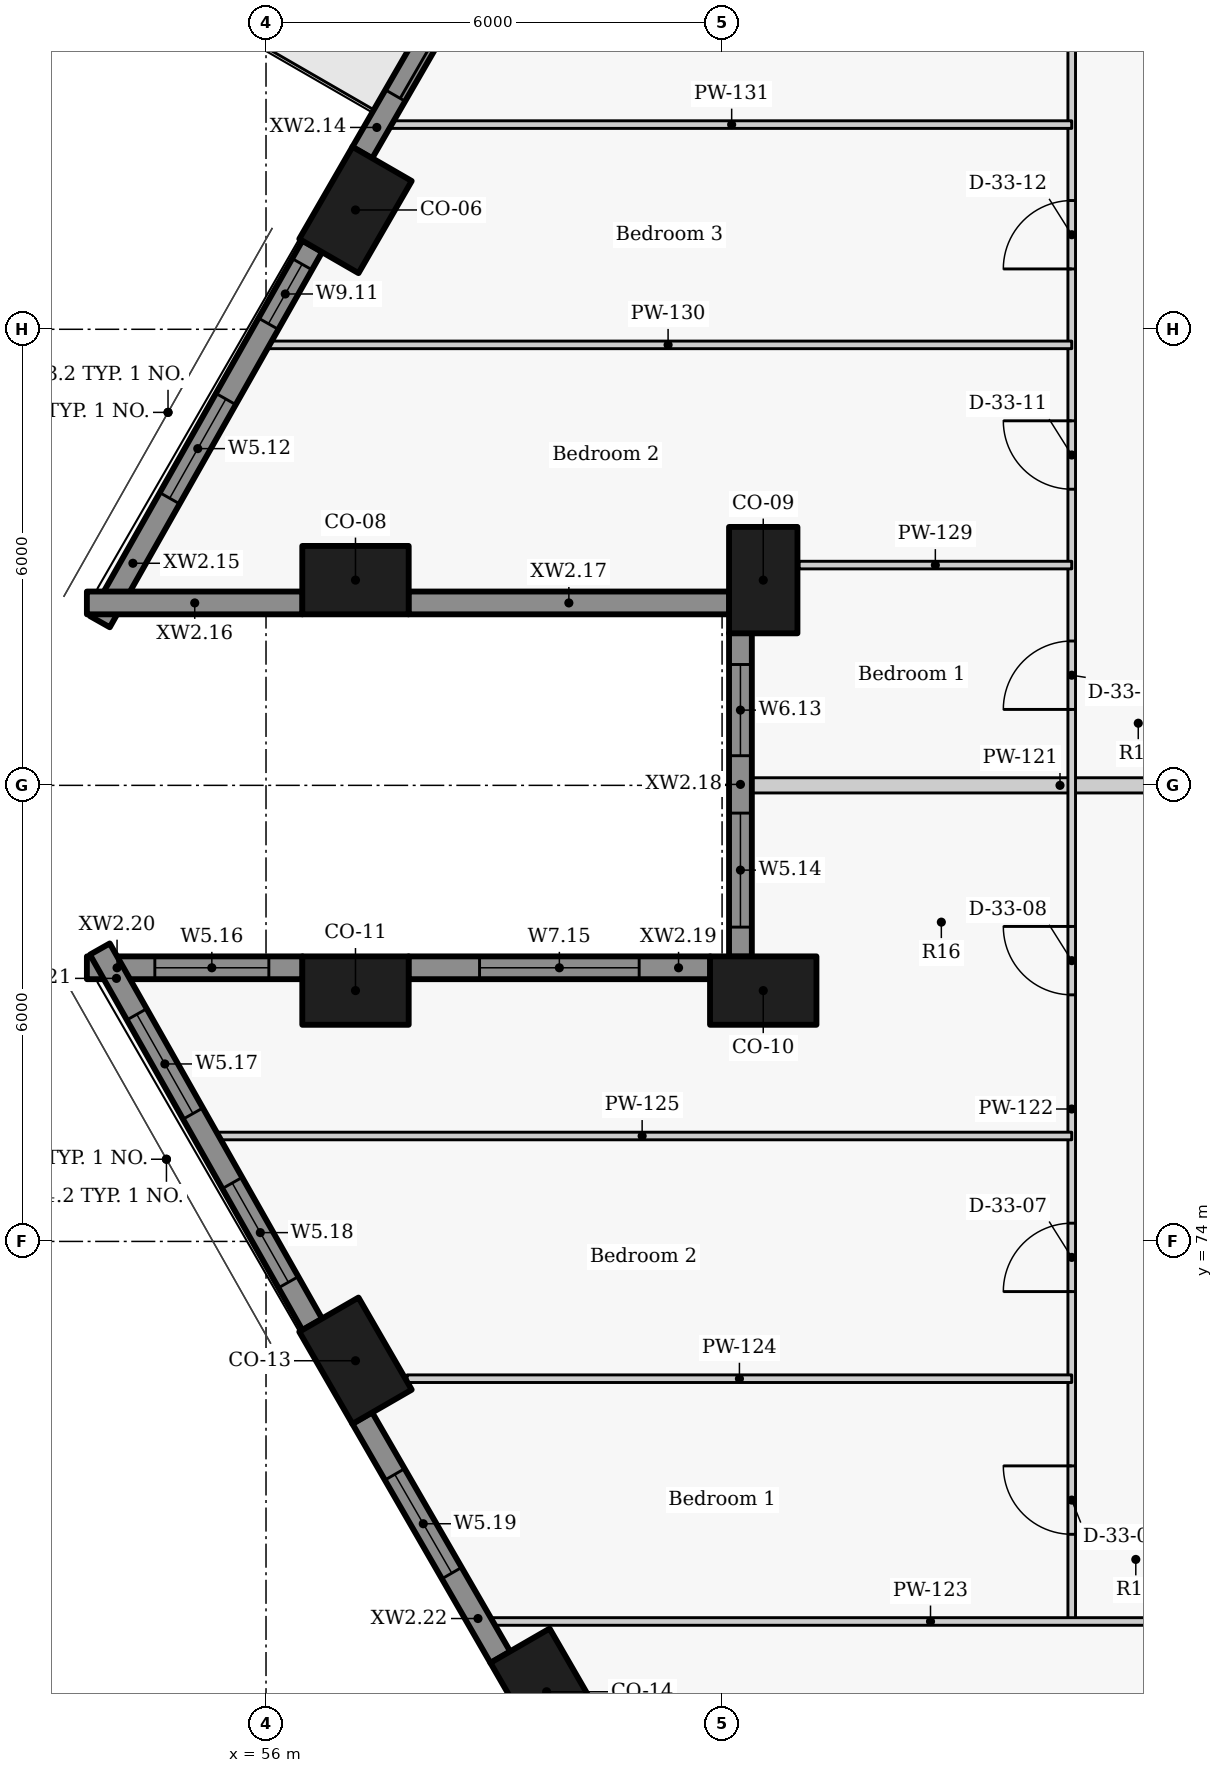
"""IFC4 building model, lengths in metres.
Left out: names, types, materials, properties, quantities, classifications, styles, units other than length and angle.
Written with IfcOpenShell. Run it as: python <this file> out.ifc"""

import sys

from ifc_helpers import new_model, si_unit, direction, frame, frame_2d, origin, origin_2d, place, context, subcontext, project, spatial, rectangle, extrude, element, fill, save


model = new_model("IFC4")
c1 = context("Model", 3, precision=1e-05, world=origin(), true_north=direction((0.0, 1.0)))
c2 = subcontext(c1, "Body", "Model", "MODEL_VIEW")
j1 = project(units=[si_unit("LENGTHUNIT", "METRE"), si_unit("PLANEANGLEUNIT", "RADIAN")], contexts=[c1])
p1 = place(None, origin())
s1 = spatial("IfcSite", under=j1, at=p1, CompositionType="ELEMENT")
p2 = place(p1, origin())
s2 = spatial("IfcBuilding", under=s1, at=p2, CompositionType="ELEMENT")
p3 = place(p2, frame((0.0, 0.0, 107.4)))
s3 = spatial("IfcBuildingStorey", under=s2, at=p3, CompositionType="ELEMENT", Elevation=107.4)
for number, where, z_axis, x_axis in (
    (1, (57.177, 87.57, 0.0), (0.0, 0.0, 1.0), (-0.5, -0.866, 0.0)),
    (2, (57.177, 82.7, 0.0), (0.0, 0.0, 1.0), (1.0, 0.0, 0.0)),
    (3, (62.542, 82.7, 0.0), (0.0, 0.0, 1.0), (0.0, -1.0, 0.0)),
    (4, (62.542, 77.3, 0.0), (0.0, 0.0, 1.0), (-1.0, 0.0, 0.0)),
    (5, (57.177, 77.3, 0.0), (0.0, 0.0, 1.0), (-1.0, 0.0, 0.0)),
    (6, (57.177, 72.43, 0.0), (0.0, 0.0, 1.0), (0.5, -0.866, 0.0)),
    (7, (59.692, 68.075, 0.0), (0.0, 0.0, 1.0), (0.5, -0.866, 0.0)),
):
    element("IfcColumn", number, at=place(p3, frame(where, z_axis=z_axis, x_axis=x_axis)), inside=s3, PredefinedType="COLUMN", context=c2, shape_type="SweptSolid", body=[
        extrude(rectangle(XDim=1.4, YDim=0.9, at=origin_2d()), origin(), (0.0, 0.0, 1.0), 3.3),
    ])
p4 = place(p3, frame((59.084, 91.472, 0.0), z_axis=(0.0, 0.0, 1.0), x_axis=(-0.500009139881, -0.866020126807, 0.0)))
e8 = element("IfcWall", 8, at=p4, inside=s3, PredefinedType="SOLIDWALL", context=c2, shape_type="SweptSolid", body=[
    extrude(rectangle(XDim=3.637, YDim=0.3, at=frame_2d((1.818, 0.0))), origin(), (0.0, 0.0, 1.0), 2.425),
])
p5 = place(p4, frame((0.368, 0.0, 0.0)))
e9 = element("IfcOpeningElement", 9, at=p5, cuts=e8, PredefinedType="OPENING", context=c2, shape_type="SweptSolid", body=[
    extrude(rectangle(XDim=2.4, YDim=2.0, at=frame_2d((1.2, 1.0))), frame((0.0, 0.16, 0.0), z_axis=(0.0, -1.0, 0.0), x_axis=(1.0, 0.0, 0.0)), (0.0, 0.0, 1.0), 0.32),
])
p6 = place(p3, frame((56.609, 87.094, 0.0), z_axis=(0.0, 0.0, 1.0), x_axis=(-0.492456858874, -0.870336855561, 0.0)))
e10 = element("IfcWall", 10, at=p6, inside=s3, PredefinedType="SOLIDWALL", context=c2, shape_type="SweptSolid", body=[
    extrude(rectangle(XDim=5.677, YDim=0.3, at=frame_2d((2.838, 0.0))), origin(), (0.0, 0.0, 1.0), 2.425),
])
p7 = place(p6, frame((0.273, 0.0, 0.9)))
e11 = element("IfcOpeningElement", 11, at=p7, cuts=e10, PredefinedType="OPENING", context=c2, shape_type="SweptSolid", body=[
    extrude(rectangle(XDim=0.9, YDim=1.1, at=frame_2d((0.45, 0.55))), frame((0.0, 0.16, 0.0), z_axis=(0.0, -1.0, 0.0), x_axis=(1.0, 0.0, 0.0)), (0.0, 0.0, 1.0), 0.32),
])
p8 = place(p6, frame((2.311, 0.0, 0.9)))
e12 = element("IfcOpeningElement", 12, at=p8, cuts=e10, PredefinedType="OPENING", context=c2, shape_type="SweptSolid", body=[
    extrude(rectangle(XDim=1.5, YDim=1.1, at=frame_2d((0.75, 0.55))), frame((0.0, 0.16, 0.0), z_axis=(0.0, -1.0, 0.0), x_axis=(1.0, 0.0, 0.0)), (0.0, 0.0, 1.0), 0.32),
])
p9 = place(p3, frame((53.643, 82.4, 0.0), z_axis=(0.0, 0.0, 1.0), x_axis=(1.0, 0.0, 0.0)))
e13 = element("IfcWall", 13, at=p9, inside=s3, PredefinedType="SOLIDWALL", context=c2, shape_type="SweptSolid", body=[
    extrude(rectangle(XDim=2.838, YDim=0.3, at=frame_2d((1.419, 0.0))), origin(), (0.0, 0.0, 1.0), 2.425),
])
p10 = place(p3, frame((57.873, 82.4, 0.0), z_axis=(0.0, 0.0, 1.0), x_axis=(1.0, 0.0, 0.0)))
e14 = element("IfcWall", 14, at=p10, inside=s3, PredefinedType="SOLIDWALL", context=c2, shape_type="SweptSolid", body=[
    extrude(rectangle(XDim=4.223, YDim=0.3, at=frame_2d((2.111, 0.0))), origin(), (0.0, 0.0, 1.0), 2.425),
])
p11 = place(p3, frame((62.242, 82.004, 0.0), z_axis=(0.0, 0.0, 1.0), x_axis=(0.0, -1.0, 0.0)))
e15 = element("IfcWall", 15, at=p11, inside=s3, PredefinedType="SOLIDWALL", context=c2, shape_type="SweptSolid", body=[
    extrude(rectangle(XDim=4.258, YDim=0.3, at=frame_2d((2.129, 0.0))), origin(), (0.0, 0.0, 1.0), 2.425),
])
p12 = place(p11, frame((0.414, 0.0, 0.9)))
e16 = element("IfcOpeningElement", 16, at=p12, cuts=e15, PredefinedType="OPENING", context=c2, shape_type="SweptSolid", body=[
    extrude(rectangle(XDim=1.2, YDim=1.1, at=frame_2d((0.6, 0.55))), frame((0.0, 0.16, 0.0), z_axis=(0.0, -1.0, 0.0), x_axis=(1.0, 0.0, 0.0)), (0.0, 0.0, 1.0), 0.32),
])
p13 = place(p11, frame((2.369, 0.0, 0.9)))
e17 = element("IfcOpeningElement", 17, at=p13, cuts=e15, PredefinedType="OPENING", context=c2, shape_type="SweptSolid", body=[
    extrude(rectangle(XDim=1.5, YDim=1.1, at=frame_2d((0.75, 0.55))), frame((0.0, 0.16, 0.0), z_axis=(0.0, -1.0, 0.0), x_axis=(1.0, 0.0, 0.0)), (0.0, 0.0, 1.0), 0.32),
])
p14 = place(p3, frame((61.846, 77.6, 0.0), z_axis=(0.0, 0.0, 1.0), x_axis=(-1.0, 0.0, 0.0)))
e18 = element("IfcWall", 18, at=p14, inside=s3, PredefinedType="SOLIDWALL", context=c2, shape_type="SweptSolid", body=[
    extrude(rectangle(XDim=3.973, YDim=0.3, at=frame_2d((1.986, 0.0))), origin(), (0.0, 0.0, 1.0), 2.425),
])
p15 = place(p14, frame((0.936, 0.0, 0.9)))
e19 = element("IfcOpeningElement", 19, at=p15, cuts=e18, PredefinedType="OPENING", context=c2, shape_type="SweptSolid", body=[
    extrude(rectangle(XDim=2.1, YDim=1.1, at=frame_2d((1.05, 0.55))), frame((0.0, 0.16, 0.0), z_axis=(0.0, -1.0, 0.0), x_axis=(1.0, 0.0, 0.0)), (0.0, 0.0, 1.0), 0.32),
])
p16 = place(p3, frame((56.481, 77.6, 0.0), z_axis=(0.0, 0.0, 1.0), x_axis=(-1.0, 0.0, 0.0)))
e20 = element("IfcWall", 20, at=p16, inside=s3, PredefinedType="SOLIDWALL", context=c2, shape_type="SweptSolid", body=[
    extrude(rectangle(XDim=2.838, YDim=0.3, at=frame_2d((1.419, 0.0))), origin(), (0.0, 0.0, 1.0), 2.425),
])
p17 = place(p16, frame((0.444, 0.0, 0.9)))
e21 = element("IfcOpeningElement", 21, at=p17, cuts=e20, PredefinedType="OPENING", context=c2, shape_type="SweptSolid", body=[
    extrude(rectangle(XDim=1.5, YDim=1.1, at=frame_2d((0.75, 0.55))), frame((0.0, 0.16, 0.0), z_axis=(0.0, -1.0, 0.0), x_axis=(1.0, 0.0, 0.0)), (0.0, 0.0, 1.0), 0.32),
])
p18 = place(p3, frame((53.814, 77.847, 0.0), z_axis=(0.0, 0.0, 1.0), x_axis=(0.492456858874, -0.870336855561, 0.0)))
e22 = element("IfcWall", 22, at=p18, inside=s3, PredefinedType="SOLIDWALL", context=c2, shape_type="SweptSolid", body=[
    extrude(rectangle(XDim=5.677, YDim=0.3, at=frame_2d((2.838, 0.0))), origin(), (0.0, 0.0, 1.0), 2.425),
])
p19 = place(p18, frame((0.987, 0.0, 0.9)))
e23 = element("IfcOpeningElement", 23, at=p19, cuts=e22, PredefinedType="OPENING", context=c2, shape_type="SweptSolid", body=[
    extrude(rectangle(XDim=1.5, YDim=1.1, at=frame_2d((0.75, 0.55))), frame((0.0, 0.16, 0.0), z_axis=(0.0, -1.0, 0.0), x_axis=(1.0, 0.0, 0.0)), (0.0, 0.0, 1.0), 0.32),
])
p20 = place(p18, frame((3.537, 0.0, 0.9)))
e24 = element("IfcOpeningElement", 24, at=p20, cuts=e22, PredefinedType="OPENING", context=c2, shape_type="SweptSolid", body=[
    extrude(rectangle(XDim=1.5, YDim=1.1, at=frame_2d((0.75, 0.55))), frame((0.0, 0.16, 0.0), z_axis=(0.0, -1.0, 0.0), x_axis=(1.0, 0.0, 0.0)), (0.0, 0.0, 1.0), 0.32),
])
p21 = place(p3, frame((57.265, 71.677, 0.0), z_axis=(0.0, 0.0, 1.0), x_axis=(0.500009139881, -0.866020126807, 0.0)))
e25 = element("IfcWall", 25, at=p21, inside=s3, PredefinedType="SOLIDWALL", context=c2, shape_type="SweptSolid", body=[
    extrude(rectangle(XDim=3.637, YDim=0.3, at=frame_2d((1.818, 0.0))), origin(), (0.0, 0.0, 1.0), 2.425),
])
p22 = place(p21, frame((0.857, 0.0, 0.9)))
e26 = element("IfcOpeningElement", 26, at=p22, cuts=e25, PredefinedType="OPENING", context=c2, shape_type="SweptSolid", body=[
    extrude(rectangle(XDim=1.5, YDim=1.1, at=frame_2d((0.75, 0.55))), frame((0.0, 0.16, 0.0), z_axis=(0.0, -1.0, 0.0), x_axis=(1.0, 0.0, 0.0)), (0.0, 0.0, 1.0), 0.32),
])
p23 = place(p3, frame((62.392, 80.0, 0.0), z_axis=(0.0, 0.0, 1.0), x_axis=(1.0, 0.0, 0.0)))
e27 = element("IfcWall", 27, at=p23, inside=s3, PredefinedType="PARTITIONING", context=c2, shape_type="SweptSolid", body=[
    extrude(rectangle(XDim=8.108, YDim=0.2, at=frame_2d((4.054, 0.0))), origin(), (0.0, 0.0, 1.0), 2.405),
])
p24 = place(p3, frame((66.6, 69.0, 0.0), z_axis=(0.0, 0.0, 1.0), x_axis=(0.0, 1.0, 0.0)))
e28 = element("IfcWall", 28, at=p24, inside=s3, PredefinedType="PARTITIONING", context=c2, shape_type="SweptSolid", body=[
    extrude(rectangle(XDim=24.2, YDim=0.1, at=frame_2d((12.1, 0.0))), origin(), (0.0, 0.0, 1.0), 3.025),
])
p25 = place(p24, frame((1.147, 0.0, 0.0)))
e29 = element("IfcOpeningElement", 29, at=p25, cuts=e28, PredefinedType="OPENING", context=c2, shape_type="SweptSolid", body=[
    extrude(rectangle(XDim=0.9, YDim=2.1, at=frame_2d((0.45, 1.05))), frame((0.0, 0.06, 0.0), z_axis=(0.0, -1.0, 0.0), x_axis=(1.0, 0.0, 0.0)), (0.0, 0.0, 1.0), 0.12),
])
p26 = place(p24, frame((4.34, 0.0, 0.0)))
e30 = element("IfcOpeningElement", 30, at=p26, cuts=e28, PredefinedType="OPENING", context=c2, shape_type="SweptSolid", body=[
    extrude(rectangle(XDim=0.9, YDim=2.1, at=frame_2d((0.45, 1.05))), frame((0.0, 0.06, 0.0), z_axis=(0.0, -1.0, 0.0), x_axis=(1.0, 0.0, 0.0)), (0.0, 0.0, 1.0), 0.12),
])
p27 = place(p24, frame((8.244, 0.0, 0.0)))
e31 = element("IfcOpeningElement", 31, at=p27, cuts=e28, PredefinedType="OPENING", context=c2, shape_type="SweptSolid", body=[
    extrude(rectangle(XDim=0.9, YDim=2.1, at=frame_2d((0.45, 1.05))), frame((0.0, 0.06, 0.0), z_axis=(0.0, -1.0, 0.0), x_axis=(1.0, 0.0, 0.0)), (0.0, 0.0, 1.0), 0.12),
])
p28 = place(p24, frame((11.999, 0.0, 0.0)))
e32 = element("IfcOpeningElement", 32, at=p28, cuts=e28, PredefinedType="OPENING", context=c2, shape_type="SweptSolid", body=[
    extrude(rectangle(XDim=0.9, YDim=2.1, at=frame_2d((0.45, 1.05))), frame((0.0, 0.06, 0.0), z_axis=(0.0, -1.0, 0.0), x_axis=(1.0, 0.0, 0.0)), (0.0, 0.0, 1.0), 0.12),
])
p29 = place(p24, frame((14.896, 0.0, 0.0)))
e33 = element("IfcOpeningElement", 33, at=p29, cuts=e28, PredefinedType="OPENING", context=c2, shape_type="SweptSolid", body=[
    extrude(rectangle(XDim=0.9, YDim=2.1, at=frame_2d((0.45, 1.05))), frame((0.0, 0.06, 0.0), z_axis=(0.0, -1.0, 0.0), x_axis=(1.0, 0.0, 0.0)), (0.0, 0.0, 1.0), 0.12),
])
p30 = place(p24, frame((17.794, 0.0, 0.0)))
e34 = element("IfcOpeningElement", 34, at=p30, cuts=e28, PredefinedType="OPENING", context=c2, shape_type="SweptSolid", body=[
    extrude(rectangle(XDim=0.9, YDim=2.1, at=frame_2d((0.45, 1.05))), frame((0.0, 0.06, 0.0), z_axis=(0.0, -1.0, 0.0), x_axis=(1.0, 0.0, 0.0)), (0.0, 0.0, 1.0), 0.12),
])
p31 = place(p24, frame((21.496, 0.0, 0.0)))
e35 = element("IfcOpeningElement", 35, at=p31, cuts=e28, PredefinedType="OPENING", context=c2, shape_type="SweptSolid", body=[
    extrude(rectangle(XDim=0.9, YDim=2.1, at=frame_2d((0.45, 1.05))), frame((0.0, 0.06, 0.0), z_axis=(0.0, -1.0, 0.0), x_axis=(1.0, 0.0, 0.0)), (0.0, 0.0, 1.0), 0.12),
])
p32 = place(p3, frame((58.985, 69.0, 0.0), z_axis=(0.0, 0.0, 1.0), x_axis=(1.0, 0.0, 0.0)))
e36 = element("IfcWall", 36, at=p32, inside=s3, PredefinedType="PARTITIONING", context=c2, shape_type="SweptSolid", body=[
    extrude(rectangle(XDim=11.515, YDim=0.1, at=frame_2d((5.758, 0.0))), origin(), (0.0, 0.0, 1.0), 2.405),
])
p33 = place(p3, frame((57.856, 72.194, 0.0), z_axis=(0.0, 0.0, 1.0), x_axis=(1.0, 0.0, 0.0)))
e37 = element("IfcWall", 37, at=p33, inside=s3, PredefinedType="PARTITIONING", context=c2, shape_type="SweptSolid", body=[
    extrude(rectangle(XDim=8.744, YDim=0.1, at=frame_2d((4.372, 0.0))), origin(), (0.0, 0.0, 1.0), 3.025),
])
p34 = place(p3, frame((55.297, 75.387, 0.0), z_axis=(0.0, 0.0, 1.0), x_axis=(1.0, 0.0, 0.0)))
e38 = element("IfcWall", 38, at=p34, inside=s3, PredefinedType="PARTITIONING", context=c2, shape_type="SweptSolid", body=[
    extrude(rectangle(XDim=11.303, YDim=0.1, at=frame_2d((5.652, 0.0))), origin(), (0.0, 0.0, 1.0), 2.405),
])
p35 = place(p3, frame((63.012, 82.898, 0.0), z_axis=(0.0, 0.0, 1.0), x_axis=(1.0, 0.0, 0.0)))
e39 = element("IfcWall", 39, at=p35, inside=s3, PredefinedType="PARTITIONING", context=c2, shape_type="SweptSolid", body=[
    extrude(rectangle(XDim=3.588, YDim=0.1, at=frame_2d((1.794, 0.0))), origin(), (0.0, 0.0, 1.0), 3.025),
])
p36 = place(p3, frame((55.979, 85.795, 0.0), z_axis=(0.0, 0.0, 1.0), x_axis=(1.0, 0.0, 0.0)))
e40 = element("IfcWall", 40, at=p36, inside=s3, PredefinedType="PARTITIONING", context=c2, shape_type="SweptSolid", body=[
    extrude(rectangle(XDim=10.621, YDim=0.1, at=frame_2d((5.31, 0.0))), origin(), (0.0, 0.0, 1.0), 2.405),
])
p37 = place(p3, frame((57.652, 88.693, 0.0), z_axis=(0.0, 0.0, 1.0), x_axis=(1.0, 0.0, 0.0)))
e41 = element("IfcWall", 41, at=p37, inside=s3, PredefinedType="PARTITIONING", context=c2, shape_type="SweptSolid", body=[
    extrude(rectangle(XDim=8.948, YDim=0.1, at=frame_2d((4.474, 0.0))), origin(), (0.0, 0.0, 1.0), 2.405),
])
p38 = place(p5, origin())
e42 = element("IfcDoor", 42, at=p38, inside=s3, OperationType="DOUBLE_DOOR_SLIDING", PredefinedType="DOOR", context=c2, shape_type="SweptSolid", body=[
    extrude(rectangle(XDim=2.4, YDim=2.0, at=frame_2d((1.2, 1.0))), frame((0.0, 0.025, 0.0), z_axis=(0.0, -1.0, 0.0), x_axis=(1.0, 0.0, 0.0)), (0.0, 0.0, 1.0), 0.05),
])
fill(e9, e42)
p39 = place(p7, origin())
e43 = element("IfcWindow", 43, at=p39, inside=s3, PartitioningType="SINGLE_PANEL", PredefinedType="WINDOW", context=c2, shape_type="SweptSolid", body=[
    extrude(rectangle(XDim=0.9, YDim=1.1, at=frame_2d((0.45, 0.55))), frame((0.0, 0.03, 0.0), z_axis=(0.0, -1.0, 0.0), x_axis=(1.0, 0.0, 0.0)), (0.0, 0.0, 1.0), 0.06),
])
fill(e11, e43)
p40 = place(p8, origin())
e44 = element("IfcWindow", 44, at=p40, inside=s3, PartitioningType="SINGLE_PANEL", PredefinedType="WINDOW", context=c2, shape_type="SweptSolid", body=[
    extrude(rectangle(XDim=1.5, YDim=1.1, at=frame_2d((0.75, 0.55))), frame((0.0, 0.03, 0.0), z_axis=(0.0, -1.0, 0.0), x_axis=(1.0, 0.0, 0.0)), (0.0, 0.0, 1.0), 0.06),
])
fill(e12, e44)
p41 = place(p12, origin())
e45 = element("IfcWindow", 45, at=p41, inside=s3, PartitioningType="SINGLE_PANEL", PredefinedType="WINDOW", context=c2, shape_type="SweptSolid", body=[
    extrude(rectangle(XDim=1.2, YDim=1.1, at=frame_2d((0.6, 0.55))), frame((0.0, 0.03, 0.0), z_axis=(0.0, -1.0, 0.0), x_axis=(1.0, 0.0, 0.0)), (0.0, 0.0, 1.0), 0.06),
])
fill(e16, e45)
p42 = place(p13, origin())
e46 = element("IfcWindow", 46, at=p42, inside=s3, PartitioningType="SINGLE_PANEL", PredefinedType="WINDOW", context=c2, shape_type="SweptSolid", body=[
    extrude(rectangle(XDim=1.5, YDim=1.1, at=frame_2d((0.75, 0.55))), frame((0.0, 0.03, 0.0), z_axis=(0.0, -1.0, 0.0), x_axis=(1.0, 0.0, 0.0)), (0.0, 0.0, 1.0), 0.06),
])
fill(e17, e46)
p43 = place(p15, origin())
e47 = element("IfcWindow", 47, at=p43, inside=s3, PartitioningType="SINGLE_PANEL", PredefinedType="WINDOW", context=c2, shape_type="SweptSolid", body=[
    extrude(rectangle(XDim=2.1, YDim=1.1, at=frame_2d((1.05, 0.55))), frame((0.0, 0.03, 0.0), z_axis=(0.0, -1.0, 0.0), x_axis=(1.0, 0.0, 0.0)), (0.0, 0.0, 1.0), 0.06),
])
fill(e19, e47)
p44 = place(p17, origin())
e48 = element("IfcWindow", 48, at=p44, inside=s3, PartitioningType="SINGLE_PANEL", PredefinedType="WINDOW", context=c2, shape_type="SweptSolid", body=[
    extrude(rectangle(XDim=1.5, YDim=1.1, at=frame_2d((0.75, 0.55))), frame((0.0, 0.03, 0.0), z_axis=(0.0, -1.0, 0.0), x_axis=(1.0, 0.0, 0.0)), (0.0, 0.0, 1.0), 0.06),
])
fill(e21, e48)
p45 = place(p19, origin())
e49 = element("IfcWindow", 49, at=p45, inside=s3, PartitioningType="SINGLE_PANEL", PredefinedType="WINDOW", context=c2, shape_type="SweptSolid", body=[
    extrude(rectangle(XDim=1.5, YDim=1.1, at=frame_2d((0.75, 0.55))), frame((0.0, 0.03, 0.0), z_axis=(0.0, -1.0, 0.0), x_axis=(1.0, 0.0, 0.0)), (0.0, 0.0, 1.0), 0.06),
])
fill(e23, e49)
p46 = place(p20, origin())
e50 = element("IfcWindow", 50, at=p46, inside=s3, PartitioningType="SINGLE_PANEL", PredefinedType="WINDOW", context=c2, shape_type="SweptSolid", body=[
    extrude(rectangle(XDim=1.5, YDim=1.1, at=frame_2d((0.75, 0.55))), frame((0.0, 0.03, 0.0), z_axis=(0.0, -1.0, 0.0), x_axis=(1.0, 0.0, 0.0)), (0.0, 0.0, 1.0), 0.06),
])
fill(e24, e50)
p47 = place(p22, origin())
e51 = element("IfcWindow", 51, at=p47, inside=s3, PartitioningType="SINGLE_PANEL", PredefinedType="WINDOW", context=c2, shape_type="SweptSolid", body=[
    extrude(rectangle(XDim=1.5, YDim=1.1, at=frame_2d((0.75, 0.55))), frame((0.0, 0.03, 0.0), z_axis=(0.0, -1.0, 0.0), x_axis=(1.0, 0.0, 0.0)), (0.0, 0.0, 1.0), 0.06),
])
fill(e26, e51)
p48 = place(p25, origin())
e52 = element("IfcDoor", 52, at=p48, inside=s3, OperationType="SINGLE_SWING_RIGHT", PredefinedType="DOOR", context=c2, shape_type="SweptSolid", body=[
    extrude(rectangle(XDim=0.9, YDim=2.1, at=frame_2d((0.45, 1.05))), frame((0.0, 0.025, 0.0), z_axis=(0.0, -1.0, 0.0), x_axis=(1.0, 0.0, 0.0)), (0.0, 0.0, 1.0), 0.05),
])
fill(e29, e52)
p49 = place(p26, origin())
e53 = element("IfcDoor", 53, at=p49, inside=s3, OperationType="SINGLE_SWING_LEFT", PredefinedType="DOOR", context=c2, shape_type="SweptSolid", body=[
    extrude(rectangle(XDim=0.9, YDim=2.1, at=frame_2d((0.45, 1.05))), frame((0.0, 0.025, 0.0), z_axis=(0.0, -1.0, 0.0), x_axis=(1.0, 0.0, 0.0)), (0.0, 0.0, 1.0), 0.05),
])
fill(e30, e53)
p50 = place(p27, origin())
e54 = element("IfcDoor", 54, at=p50, inside=s3, OperationType="SINGLE_SWING_RIGHT", PredefinedType="DOOR", context=c2, shape_type="SweptSolid", body=[
    extrude(rectangle(XDim=0.9, YDim=2.1, at=frame_2d((0.45, 1.05))), frame((0.0, 0.025, 0.0), z_axis=(0.0, -1.0, 0.0), x_axis=(1.0, 0.0, 0.0)), (0.0, 0.0, 1.0), 0.05),
])
fill(e31, e54)
p51 = place(p28, origin())
e55 = element("IfcDoor", 55, at=p51, inside=s3, OperationType="SINGLE_SWING_LEFT", PredefinedType="DOOR", context=c2, shape_type="SweptSolid", body=[
    extrude(rectangle(XDim=0.9, YDim=2.1, at=frame_2d((0.45, 1.05))), frame((0.0, 0.025, 0.0), z_axis=(0.0, -1.0, 0.0), x_axis=(1.0, 0.0, 0.0)), (0.0, 0.0, 1.0), 0.05),
])
fill(e32, e55)
p52 = place(p29, origin())
e56 = element("IfcDoor", 56, at=p52, inside=s3, OperationType="SINGLE_SWING_RIGHT", PredefinedType="DOOR", context=c2, shape_type="SweptSolid", body=[
    extrude(rectangle(XDim=0.9, YDim=2.1, at=frame_2d((0.45, 1.05))), frame((0.0, 0.025, 0.0), z_axis=(0.0, -1.0, 0.0), x_axis=(1.0, 0.0, 0.0)), (0.0, 0.0, 1.0), 0.05),
])
fill(e33, e56)
p53 = place(p30, origin())
e57 = element("IfcDoor", 57, at=p53, inside=s3, OperationType="SINGLE_SWING_LEFT", PredefinedType="DOOR", context=c2, shape_type="SweptSolid", body=[
    extrude(rectangle(XDim=0.9, YDim=2.1, at=frame_2d((0.45, 1.05))), frame((0.0, 0.025, 0.0), z_axis=(0.0, -1.0, 0.0), x_axis=(1.0, 0.0, 0.0)), (0.0, 0.0, 1.0), 0.05),
])
fill(e34, e57)
save(model, sys.argv[1])
